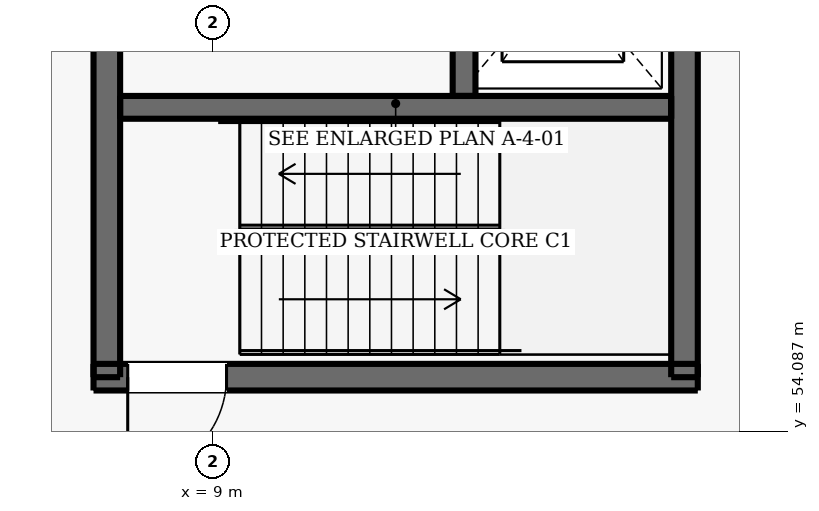
"""IFC4 building model, lengths in metres.
Left out: names, types, materials, properties, quantities, classifications, styles, units other than length and angle.
Written with IfcOpenShell. Run it as: python <this file> out.ifc"""

import sys

from ifc_helpers import new_model, si_unit, direction, frame, frame_2d, origin, place, context, subcontext, project, spatial, rectangle, extrude, element, fill, save


model = new_model("IFC4")
c1 = context("Model", 3, precision=1e-05, world=origin(), true_north=direction((0.0, 1.0)))
c2 = subcontext(c1, "Body", "Model", "MODEL_VIEW")
j1 = project(units=[si_unit("LENGTHUNIT", "METRE"), si_unit("PLANEANGLEUNIT", "RADIAN")], contexts=[c1])
p1 = place(None, origin())
s1 = spatial("IfcSite", under=j1, at=p1, CompositionType="ELEMENT")
p2 = place(p1, origin())
s2 = spatial("IfcBuilding", under=s1, at=p2, CompositionType="ELEMENT")
p3 = place(p2, frame((0.0, 0.0, 5.1)))
s3 = spatial("IfcBuildingStorey", under=s2, at=p3, CompositionType="ELEMENT", Elevation=5.1)
p4 = place(p3, frame((7.425, 54.8, 0.0), z_axis=(0.0, 0.0, 1.0), x_axis=(1.0, 0.0, 0.0)))
e1 = element("IfcWall", 1, at=p4, inside=s3, PredefinedType="SHEAR", context=c2, shape_type="SweptSolid", body=[
    extrude(rectangle(XDim=7.95, YDim=0.35, at=frame_2d((3.975, 0.0))), origin(), (0.0, 0.0, 1.0), 4.5),
])
p5 = place(p4, frame((0.45, 0.0, 0.0)))
e2 = element("IfcOpeningElement", 2, at=p5, cuts=e1, PredefinedType="OPENING", context=c2, shape_type="SweptSolid", body=[
    extrude(rectangle(XDim=1.3, YDim=2.15, at=frame_2d((0.65, 1.075))), frame((0.0, 0.185, 0.0), z_axis=(0.0, -1.0, 0.0), x_axis=(1.0, 0.0, 0.0)), (0.0, 0.0, 1.0), 0.37),
])
for number, where, z_axis, x_axis in (
    (3, (7.6, 54.8, 0.0), (0.0, 0.0, 1.0), (0.0, 1.0, 0.0)),
    (4, (15.2, 54.8, 0.0), (0.0, 0.0, 1.0), (0.0, 1.0, 0.0)),
):
    element("IfcWall", number, at=place(p3, frame(where, z_axis=z_axis, x_axis=x_axis)), inside=s3, PredefinedType="SHEAR", context=c2, shape_type="SweptSolid", body=[
        extrude(rectangle(XDim=7.2, YDim=0.35, at=frame_2d((3.6, 0.0))), origin(), (0.0, 0.0, 1.0), 4.5),
    ])
p6 = place(p3, frame((7.775, 58.35, 0.0), z_axis=(0.0, 0.0, 1.0), x_axis=(1.0, 0.0, 0.0)))
e5 = element("IfcWall", 5, at=p6, inside=s3, PredefinedType="SHEAR", context=c2, shape_type="SweptSolid", body=[
    extrude(rectangle(XDim=7.25, YDim=0.3, at=frame_2d((3.625, 0.0))), origin(), (0.0, 0.0, 1.0), 4.5),
])
p7 = place(p3, frame((12.3, 58.5, 0.0), z_axis=(0.0, 0.0, 1.0), x_axis=(0.0, 1.0, 0.0)))
e6 = element("IfcWall", 6, at=p7, inside=s3, PredefinedType="SHEAR", context=c2, shape_type="SweptSolid", body=[
    extrude(rectangle(XDim=3.325, YDim=0.3, at=frame_2d((1.663, 0.0))), origin(), (0.0, 0.0, 1.0), 4.5),
])
p8 = place(p7, frame((1.113, 0.0, 0.0)))
e7 = element("IfcOpeningElement", 7, at=p8, cuts=e6, PredefinedType="OPENING", context=c2, shape_type="SweptSolid", body=[
    extrude(rectangle(XDim=1.1, YDim=2.15, at=frame_2d((0.55, 1.075))), frame((0.0, 0.16, 0.0), z_axis=(0.0, -1.0, 0.0), x_axis=(1.0, 0.0, 0.0)), (0.0, 0.0, 1.0), 0.32),
])
p9 = place(p5, frame((1.3, 0.0, 0.0), z_axis=(0.0, 0.0, 1.0), x_axis=(-1.0, 0.0, 0.0)))
e8 = element("IfcDoor", 8, at=p9, inside=s3, OperationType="SINGLE_SWING_LEFT", PredefinedType="DOOR", context=c2, shape_type="SweptSolid", body=[
    extrude(rectangle(XDim=1.3, YDim=2.15, at=frame_2d((0.65, 1.075))), frame((0.0, 0.025, 0.0), z_axis=(0.0, -1.0, 0.0), x_axis=(1.0, 0.0, 0.0)), (0.0, 0.0, 1.0), 0.05),
])
fill(e2, e8)
save(model, sys.argv[1])
